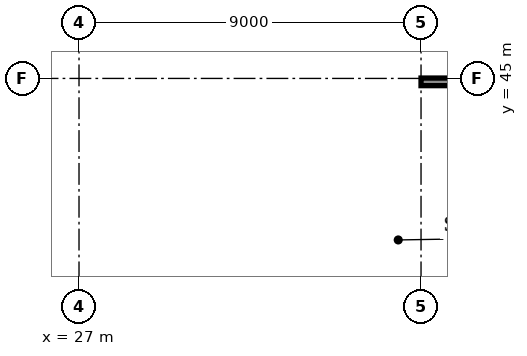
"""IFC4 building model, lengths in metres.
Left out: names, types, materials, properties, quantities, classifications, styles, units other than length and angle.
Written with IfcOpenShell. Run it as: python <this file> out.ifc"""

import sys

from ifc_helpers import new_model, si_unit, direction, frame, frame_2d, origin, place, context, subcontext, project, spatial, rectangle, extrude, element, fill, save


model = new_model("IFC4")
c1 = context("Model", 3, precision=1e-05, world=origin(), true_north=direction((0.0, 1.0)))
c2 = subcontext(c1, "Body", "Model", "MODEL_VIEW")
j1 = project(units=[si_unit("LENGTHUNIT", "METRE"), si_unit("PLANEANGLEUNIT", "RADIAN")], contexts=[c1])
p1 = place(None, origin())
s1 = spatial("IfcSite", under=j1, at=p1, CompositionType="ELEMENT")
p2 = place(p1, origin())
s2 = spatial("IfcBuilding", under=s1, at=p2, CompositionType="ELEMENT")
p3 = place(p2, frame((0.0, 0.0, 13.4)))
s3 = spatial("IfcBuildingStorey", under=s2, at=p3, CompositionType="ELEMENT", Elevation=13.4)
p4 = place(p3, frame((36.0, 44.91, 0.0), z_axis=(0.0, 0.0, 1.0), x_axis=(1.0, 0.0, 0.0)))
e1 = element("IfcWall", 1, at=p4, inside=s3, PredefinedType="SOLIDWALL", context=c2, shape_type="SweptSolid", body=[
    extrude(rectangle(XDim=8.85, YDim=0.3, at=frame_2d((4.425, 0.0))), origin(), (0.0, 0.0, 1.0), 7.22),
])
p5 = place(p4, frame((1.65, 0.0, 1.2)))
e2 = element("IfcOpeningElement", 2, at=p5, cuts=e1, PredefinedType="OPENING", context=c2, shape_type="SweptSolid", body=[
    extrude(rectangle(XDim=1.2, YDim=4.8, at=frame_2d((0.6, 2.4))), frame((0.0, 0.16, 0.0), z_axis=(0.0, -1.0, 0.0), x_axis=(1.0, 0.0, 0.0)), (0.0, 0.0, 1.0), 0.32),
])
p6 = place(p4, frame((6.15, 0.0, 1.2)))
e3 = element("IfcOpeningElement", 3, at=p6, cuts=e1, PredefinedType="OPENING", context=c2, shape_type="SweptSolid", body=[
    extrude(rectangle(XDim=1.2, YDim=4.8, at=frame_2d((0.6, 2.4))), frame((0.0, 0.16, 0.0), z_axis=(0.0, -1.0, 0.0), x_axis=(1.0, 0.0, 0.0)), (0.0, 0.0, 1.0), 0.32),
])
p7 = place(p3, frame((36.0, 44.91, 7.678), z_axis=(0.0, 0.0, 1.0), x_axis=(1.0, 0.0, 0.0)))
e4 = element("IfcWall", 4, at=p7, inside=s3, PredefinedType="PARAPET", context=c2, shape_type="SweptSolid", body=[
    extrude(rectangle(XDim=8.85, YDim=0.2, at=frame_2d((4.425, 0.0))), origin(), (0.0, 0.0, 1.0), 0.522),
])
p8 = place(p3, frame((27.09, 36.15, 0.0), z_axis=(0.0, 0.0, 1.0), x_axis=(0.0, 1.0, 0.0)))
e5 = element("IfcWall", 5, at=p8, inside=s3, PredefinedType="SOLIDWALL", context=c2, shape_type="SweptSolid", body=[
    extrude(rectangle(XDim=4.35, YDim=0.3, at=frame_2d((2.175, 0.0))), origin(), (0.0, 0.0, 1.0), 7.678),
])
p9 = place(p8, frame((1.5, 0.0, 1.2)))
e6 = element("IfcOpeningElement", 6, at=p9, cuts=e5, PredefinedType="OPENING", context=c2, shape_type="SweptSolid", body=[
    extrude(rectangle(XDim=1.2, YDim=4.8, at=frame_2d((0.6, 2.4))), frame((0.0, 0.16, 0.0), z_axis=(0.0, -1.0, 0.0), x_axis=(1.0, 0.0, 0.0)), (0.0, 0.0, 1.0), 0.32),
])
p10 = place(p3, frame((27.0, 40.65, 0.0), z_axis=(0.0, 0.0, 1.0), x_axis=(1.0, 0.0, 0.0)))
e7 = element("IfcWall", 7, at=p10, inside=s3, PredefinedType="SOLIDWALL", context=c2, shape_type="SweptSolid", body=[
    extrude(rectangle(XDim=9.0, YDim=0.3, at=frame_2d((4.5, 0.0))), origin(), (0.0, 0.0, 1.0), 7.428),
])
p11 = place(p10, frame((6.05, 0.0, 0.0)))
e8 = element("IfcOpeningElement", 8, at=p11, cuts=e7, PredefinedType="OPENING", context=c2, shape_type="SweptSolid", body=[
    extrude(rectangle(XDim=1.8, YDim=2.1, at=frame_2d((0.9, 1.05))), frame((0.0, 0.16, 0.0), z_axis=(0.0, -1.0, 0.0), x_axis=(1.0, 0.0, 0.0)), (0.0, 0.0, 1.0), 0.32),
])
p12 = place(p3, frame((35.85, 40.8, 0.0), z_axis=(0.0, 0.0, 1.0), x_axis=(0.0, 1.0, 0.0)))
e9 = element("IfcWall", 9, at=p12, inside=s3, PredefinedType="SOLIDWALL", context=c2, shape_type="SweptSolid", body=[
    extrude(rectangle(XDim=3.9, YDim=0.3, at=frame_2d((1.95, 0.0))), origin(), (0.0, 0.0, 1.0), 7.428),
])
p13 = place(p3, frame((27.0, 44.85, 0.0), z_axis=(0.0, 0.0, 1.0), x_axis=(1.0, 0.0, 0.0)))
e10 = element("IfcWall", 10, at=p13, inside=s3, PredefinedType="SOLIDWALL", context=c2, shape_type="SweptSolid", body=[
    extrude(rectangle(XDim=9.0, YDim=0.3, at=frame_2d((4.5, 0.0))), origin(), (0.0, 0.0, 1.0), 7.428),
])
p14 = place(p3, frame((27.15, 40.8, 0.0), z_axis=(0.0, 0.0, 1.0), x_axis=(0.0, 1.0, 0.0)))
e11 = element("IfcWall", 11, at=p14, inside=s3, PredefinedType="SOLIDWALL", context=c2, shape_type="SweptSolid", body=[
    extrude(rectangle(XDim=3.9, YDim=0.3, at=frame_2d((1.95, 0.0))), origin(), (0.0, 0.0, 1.0), 7.428),
])
p15 = place(p11, origin())
e12 = element("IfcDoor", 12, at=p15, inside=s3, OperationType="DOUBLE_DOOR_SINGLE_SWING", PredefinedType="DOOR", context=c2, shape_type="SweptSolid", body=[
    extrude(rectangle(XDim=1.8, YDim=2.1, at=frame_2d((0.9, 1.05))), frame((0.0, 0.025, 0.0), z_axis=(0.0, -1.0, 0.0), x_axis=(1.0, 0.0, 0.0)), (0.0, 0.0, 1.0), 0.05),
])
fill(e8, e12)
save(model, sys.argv[1])
